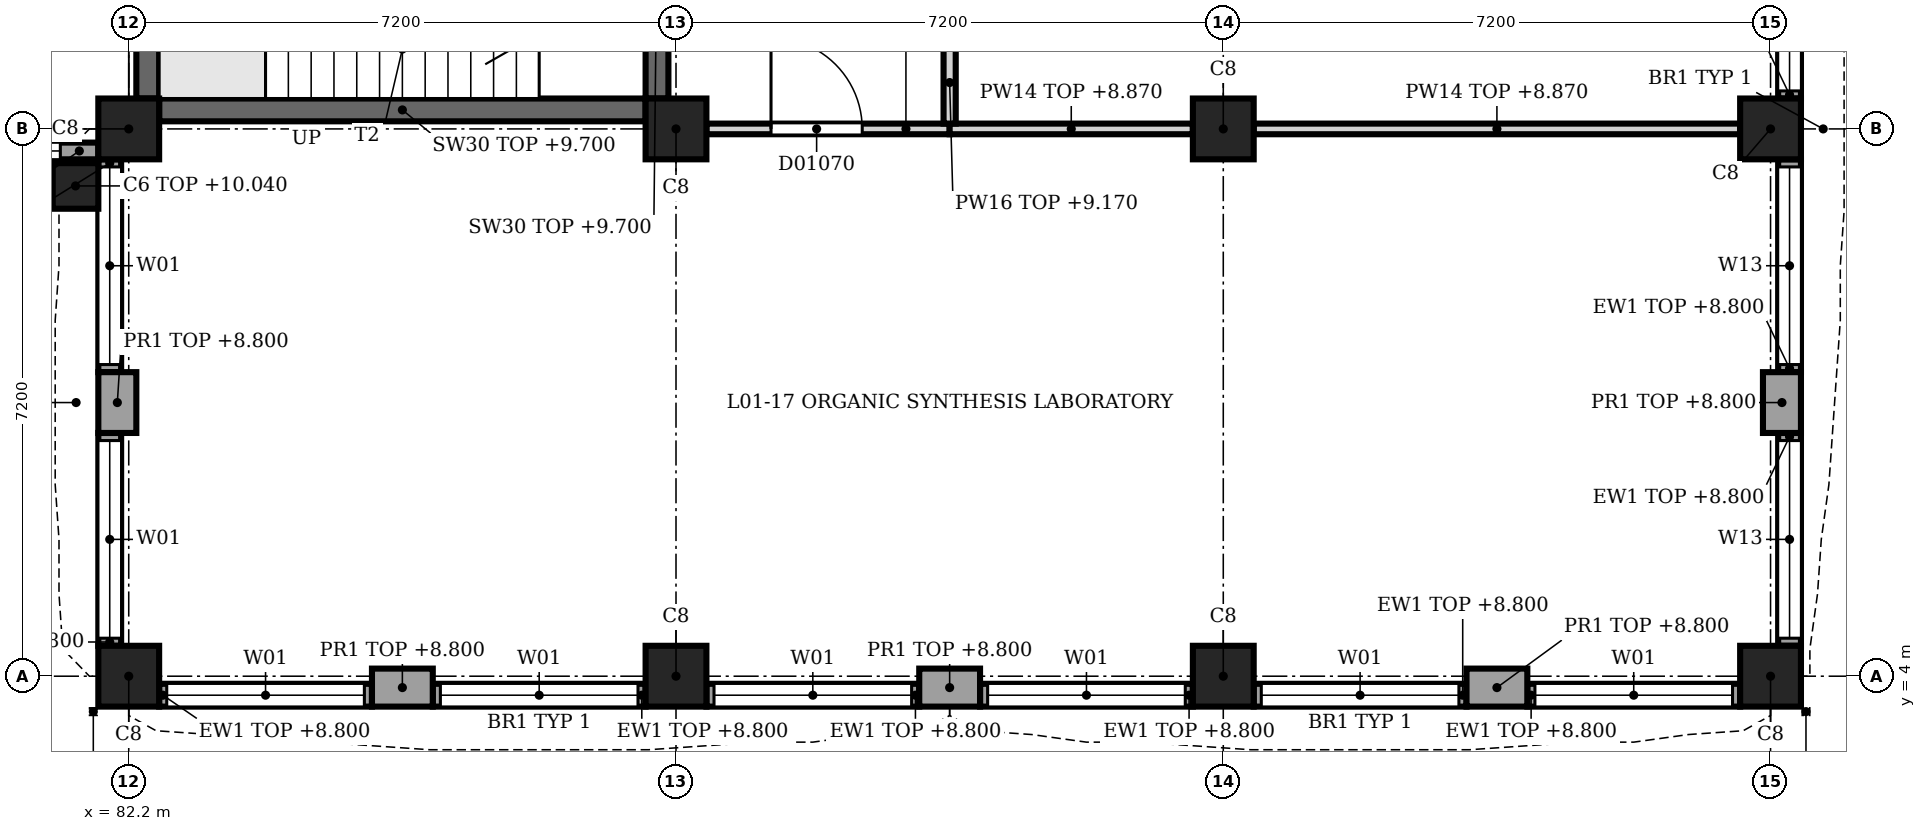
"""IFC4 building model, lengths in metres.
Left out: names, types, materials, properties, quantities, classifications, styles, units other than length and angle.
Written with IfcOpenShell. Run it as: python <this file> out.ifc"""

import sys

from ifc_helpers import new_model, si_unit, direction, frame, frame_2d, origin, origin_2d, place, context, subcontext, project, spatial, rectangle, extrude, element, fill, save


model = new_model("IFC4")
c1 = context("Model", 3, precision=1e-05, world=origin(), true_north=direction((0.0, 1.0)))
c2 = subcontext(c1, "Body", "Model", "MODEL_VIEW")
j1 = project(units=[si_unit("LENGTHUNIT", "METRE"), si_unit("PLANEANGLEUNIT", "RADIAN")], contexts=[c1])
p1 = place(None, origin())
s1 = spatial("IfcSite", under=j1, at=p1, CompositionType="ELEMENT")
p2 = place(p1, origin())
s2 = spatial("IfcBuilding", under=s1, at=p2, CompositionType="ELEMENT")
p3 = place(p2, frame((0.0, 0.0, 5.4)))
s3 = spatial("IfcBuildingStorey", under=s2, at=p3, CompositionType="ELEMENT", Elevation=5.4)
for number, where, z_axis, x_axis in (
    (1, (82.2, 4.0, 0.0), (0.0, 0.0, 1.0), (1.0, 0.0, 0.0)),
    (2, (82.2, 11.2, 0.0), (0.0, 0.0, 1.0), (1.0, 0.0, 0.0)),
    (3, (89.4, 4.0, 0.0), (0.0, 0.0, 1.0), (1.0, 0.0, 0.0)),
    (4, (89.4, 11.2, 0.0), (0.0, 0.0, 1.0), (1.0, 0.0, 0.0)),
    (5, (96.6, 4.0, 0.0), (0.0, 0.0, 1.0), (1.0, 0.0, 0.0)),
    (6, (96.6, 11.2, 0.0), (0.0, 0.0, 1.0), (1.0, 0.0, 0.0)),
    (7, (103.8, 4.0, 0.0), (0.0, 0.0, 1.0), (1.0, 0.0, 0.0)),
    (8, (103.8, 11.2, 0.0), (0.0, 0.0, 1.0), (1.0, 0.0, 0.0)),
):
    element("IfcColumn", number, at=place(p3, frame(where, z_axis=z_axis, x_axis=x_axis)), inside=s3, PredefinedType="COLUMN", context=c2, shape_type="SweptSolid", body=[
        extrude(rectangle(XDim=0.8, YDim=0.8, at=origin_2d()), origin(), (0.0, 0.0, 1.0), 4.5),
    ])
p4 = place(p3, frame((81.5, 10.45, 0.0), z_axis=(0.0, 0.0, 1.0), x_axis=(1.0, 0.0, 0.0)))
e9 = element("IfcColumn", 9, at=p4, inside=s3, PredefinedType="COLUMN", context=c2, shape_type="SweptSolid", body=[
    extrude(rectangle(XDim=0.6, YDim=0.6, at=origin_2d()), origin(), (0.0, 0.0, 1.0), 4.64),
])
p5 = place(p3, frame((103.95, 8.0, 0.0), z_axis=(0.0, 0.0, 1.0), x_axis=(0.0, -1.0, 0.0)))
e10 = element("IfcWall", 10, at=p5, inside=s3, PredefinedType="SOLIDWALL", context=c2, shape_type="SweptSolid", body=[
    extrude(rectangle(XDim=0.8, YDim=0.5, at=frame_2d((0.4, 0.0))), origin(), (0.0, 0.0, 1.0), 3.4),
])
p6 = place(p3, frame((104.05, 14.4, 0.0), z_axis=(0.0, 0.0, 1.0), x_axis=(0.0, -1.0, 0.0)))
e11 = element("IfcWall", 11, at=p6, inside=s3, PredefinedType="SOLIDWALL", context=c2, shape_type="SweptSolid", body=[
    extrude(rectangle(XDim=2.8, YDim=0.3, at=frame_2d((1.4, 0.0))), origin(), (0.0, 0.0, 1.0), 3.4),
])
p7 = place(p6, frame((0.1, 0.0, 0.9)))
e12 = element("IfcOpeningElement", 12, at=p7, cuts=e11, PredefinedType="OPENING", context=c2, shape_type="SweptSolid", body=[
    extrude(rectangle(XDim=2.6, YDim=2.2, at=frame_2d((1.3, 1.1))), frame((0.0, 0.16, 0.0), z_axis=(0.0, -1.0, 0.0), x_axis=(1.0, 0.0, 0.0)), (0.0, 0.0, 1.0), 0.32),
])
p8 = place(p3, frame((104.05, 10.8, 0.0), z_axis=(0.0, 0.0, 1.0), x_axis=(0.0, -1.0, 0.0)))
e13 = element("IfcWall", 13, at=p8, inside=s3, PredefinedType="SOLIDWALL", context=c2, shape_type="SweptSolid", body=[
    extrude(rectangle(XDim=2.8, YDim=0.3, at=frame_2d((1.4, 0.0))), origin(), (0.0, 0.0, 1.0), 3.4),
])
p9 = place(p8, frame((0.1, 0.0, 0.9)))
e14 = element("IfcOpeningElement", 14, at=p9, cuts=e13, PredefinedType="OPENING", context=c2, shape_type="SweptSolid", body=[
    extrude(rectangle(XDim=2.6, YDim=2.2, at=frame_2d((1.3, 1.1))), frame((0.0, 0.16, 0.0), z_axis=(0.0, -1.0, 0.0), x_axis=(1.0, 0.0, 0.0)), (0.0, 0.0, 1.0), 0.32),
])
p10 = place(p3, frame((104.05, 7.2, 0.0), z_axis=(0.0, 0.0, 1.0), x_axis=(0.0, -1.0, 0.0)))
e15 = element("IfcWall", 15, at=p10, inside=s3, PredefinedType="SOLIDWALL", context=c2, shape_type="SweptSolid", body=[
    extrude(rectangle(XDim=2.8, YDim=0.3, at=frame_2d((1.4, 0.0))), origin(), (0.0, 0.0, 1.0), 3.4),
])
p11 = place(p10, frame((0.1, 0.0, 0.9)))
e16 = element("IfcOpeningElement", 16, at=p11, cuts=e15, PredefinedType="OPENING", context=c2, shape_type="SweptSolid", body=[
    extrude(rectangle(XDim=2.6, YDim=2.2, at=frame_2d((1.3, 1.1))), frame((0.0, 0.16, 0.0), z_axis=(0.0, -1.0, 0.0), x_axis=(1.0, 0.0, 0.0)), (0.0, 0.0, 1.0), 0.32),
])
p12 = place(p3, frame((100.6, 3.85, 0.0), z_axis=(0.0, 0.0, 1.0), x_axis=(-1.0, 0.0, 0.0)))
e17 = element("IfcWall", 17, at=p12, inside=s3, PredefinedType="SOLIDWALL", context=c2, shape_type="SweptSolid", body=[
    extrude(rectangle(XDim=0.8, YDim=0.5, at=frame_2d((0.4, 0.0))), origin(), (0.0, 0.0, 1.0), 3.4),
])
p13 = place(p3, frame((93.4, 3.85, 0.0), z_axis=(0.0, 0.0, 1.0), x_axis=(-1.0, 0.0, 0.0)))
e18 = element("IfcWall", 18, at=p13, inside=s3, PredefinedType="SOLIDWALL", context=c2, shape_type="SweptSolid", body=[
    extrude(rectangle(XDim=0.8, YDim=0.5, at=frame_2d((0.4, 0.0))), origin(), (0.0, 0.0, 1.0), 3.4),
])
p14 = place(p3, frame((86.2, 3.85, 0.0), z_axis=(0.0, 0.0, 1.0), x_axis=(-1.0, 0.0, 0.0)))
e19 = element("IfcWall", 19, at=p14, inside=s3, PredefinedType="SOLIDWALL", context=c2, shape_type="SweptSolid", body=[
    extrude(rectangle(XDim=0.8, YDim=0.5, at=frame_2d((0.4, 0.0))), origin(), (0.0, 0.0, 1.0), 3.4),
])
p15 = place(p3, frame((103.4, 3.75, 0.0), z_axis=(0.0, 0.0, 1.0), x_axis=(-1.0, 0.0, 0.0)))
e20 = element("IfcWall", 20, at=p15, inside=s3, PredefinedType="SOLIDWALL", context=c2, shape_type="SweptSolid", body=[
    extrude(rectangle(XDim=2.8, YDim=0.3, at=frame_2d((1.4, 0.0))), origin(), (0.0, 0.0, 1.0), 3.4),
])
p16 = place(p15, frame((0.1, 0.0, 0.9)))
e21 = element("IfcOpeningElement", 21, at=p16, cuts=e20, PredefinedType="OPENING", context=c2, shape_type="SweptSolid", body=[
    extrude(rectangle(XDim=2.6, YDim=2.4, at=frame_2d((1.3, 1.2))), frame((0.0, 0.16, 0.0), z_axis=(0.0, -1.0, 0.0), x_axis=(1.0, 0.0, 0.0)), (0.0, 0.0, 1.0), 0.32),
])
p17 = place(p3, frame((99.8, 3.75, 0.0), z_axis=(0.0, 0.0, 1.0), x_axis=(-1.0, 0.0, 0.0)))
e22 = element("IfcWall", 22, at=p17, inside=s3, PredefinedType="SOLIDWALL", context=c2, shape_type="SweptSolid", body=[
    extrude(rectangle(XDim=2.8, YDim=0.3, at=frame_2d((1.4, 0.0))), origin(), (0.0, 0.0, 1.0), 3.4),
])
p18 = place(p17, frame((0.1, 0.0, 0.9)))
e23 = element("IfcOpeningElement", 23, at=p18, cuts=e22, PredefinedType="OPENING", context=c2, shape_type="SweptSolid", body=[
    extrude(rectangle(XDim=2.6, YDim=2.4, at=frame_2d((1.3, 1.2))), frame((0.0, 0.16, 0.0), z_axis=(0.0, -1.0, 0.0), x_axis=(1.0, 0.0, 0.0)), (0.0, 0.0, 1.0), 0.32),
])
p19 = place(p3, frame((96.2, 3.75, 0.0), z_axis=(0.0, 0.0, 1.0), x_axis=(-1.0, 0.0, 0.0)))
e24 = element("IfcWall", 24, at=p19, inside=s3, PredefinedType="SOLIDWALL", context=c2, shape_type="SweptSolid", body=[
    extrude(rectangle(XDim=2.8, YDim=0.3, at=frame_2d((1.4, 0.0))), origin(), (0.0, 0.0, 1.0), 3.4),
])
p20 = place(p19, frame((0.1, 0.0, 0.9)))
e25 = element("IfcOpeningElement", 25, at=p20, cuts=e24, PredefinedType="OPENING", context=c2, shape_type="SweptSolid", body=[
    extrude(rectangle(XDim=2.6, YDim=2.4, at=frame_2d((1.3, 1.2))), frame((0.0, 0.16, 0.0), z_axis=(0.0, -1.0, 0.0), x_axis=(1.0, 0.0, 0.0)), (0.0, 0.0, 1.0), 0.32),
])
p21 = place(p3, frame((92.6, 3.75, 0.0), z_axis=(0.0, 0.0, 1.0), x_axis=(-1.0, 0.0, 0.0)))
e26 = element("IfcWall", 26, at=p21, inside=s3, PredefinedType="SOLIDWALL", context=c2, shape_type="SweptSolid", body=[
    extrude(rectangle(XDim=2.8, YDim=0.3, at=frame_2d((1.4, 0.0))), origin(), (0.0, 0.0, 1.0), 3.4),
])
p22 = place(p21, frame((0.1, 0.0, 0.9)))
e27 = element("IfcOpeningElement", 27, at=p22, cuts=e26, PredefinedType="OPENING", context=c2, shape_type="SweptSolid", body=[
    extrude(rectangle(XDim=2.6, YDim=2.4, at=frame_2d((1.3, 1.2))), frame((0.0, 0.16, 0.0), z_axis=(0.0, -1.0, 0.0), x_axis=(1.0, 0.0, 0.0)), (0.0, 0.0, 1.0), 0.32),
])
p23 = place(p3, frame((89.0, 3.75, 0.0), z_axis=(0.0, 0.0, 1.0), x_axis=(-1.0, 0.0, 0.0)))
e28 = element("IfcWall", 28, at=p23, inside=s3, PredefinedType="SOLIDWALL", context=c2, shape_type="SweptSolid", body=[
    extrude(rectangle(XDim=2.8, YDim=0.3, at=frame_2d((1.4, 0.0))), origin(), (0.0, 0.0, 1.0), 3.4),
])
p24 = place(p23, frame((0.1, 0.0, 0.9)))
e29 = element("IfcOpeningElement", 29, at=p24, cuts=e28, PredefinedType="OPENING", context=c2, shape_type="SweptSolid", body=[
    extrude(rectangle(XDim=2.6, YDim=2.4, at=frame_2d((1.3, 1.2))), frame((0.0, 0.16, 0.0), z_axis=(0.0, -1.0, 0.0), x_axis=(1.0, 0.0, 0.0)), (0.0, 0.0, 1.0), 0.32),
])
p25 = place(p3, frame((85.4, 3.75, 0.0), z_axis=(0.0, 0.0, 1.0), x_axis=(-1.0, 0.0, 0.0)))
e30 = element("IfcWall", 30, at=p25, inside=s3, PredefinedType="SOLIDWALL", context=c2, shape_type="SweptSolid", body=[
    extrude(rectangle(XDim=2.8, YDim=0.3, at=frame_2d((1.4, 0.0))), origin(), (0.0, 0.0, 1.0), 3.4),
])
p26 = place(p25, frame((0.1, 0.0, 0.9)))
e31 = element("IfcOpeningElement", 31, at=p26, cuts=e30, PredefinedType="OPENING", context=c2, shape_type="SweptSolid", body=[
    extrude(rectangle(XDim=2.6, YDim=2.4, at=frame_2d((1.3, 1.2))), frame((0.0, 0.16, 0.0), z_axis=(0.0, -1.0, 0.0), x_axis=(1.0, 0.0, 0.0)), (0.0, 0.0, 1.0), 0.32),
])
p27 = place(p3, frame((82.05, 7.2, 0.0), z_axis=(0.0, 0.0, 1.0), x_axis=(0.0, 1.0, 0.0)))
e32 = element("IfcWall", 32, at=p27, inside=s3, PredefinedType="SOLIDWALL", context=c2, shape_type="SweptSolid", body=[
    extrude(rectangle(XDim=0.8, YDim=0.5, at=frame_2d((0.4, 0.0))), origin(), (0.0, 0.0, 1.0), 3.4),
])
p28 = place(p3, frame((81.95, 4.4, 0.0), z_axis=(0.0, 0.0, 1.0), x_axis=(0.0, 1.0, 0.0)))
e33 = element("IfcWall", 33, at=p28, inside=s3, PredefinedType="SOLIDWALL", context=c2, shape_type="SweptSolid", body=[
    extrude(rectangle(XDim=2.8, YDim=0.3, at=frame_2d((1.4, 0.0))), origin(), (0.0, 0.0, 1.0), 3.4),
])
p29 = place(p28, frame((0.1, 0.0, 0.9)))
e34 = element("IfcOpeningElement", 34, at=p29, cuts=e33, PredefinedType="OPENING", context=c2, shape_type="SweptSolid", body=[
    extrude(rectangle(XDim=2.6, YDim=2.4, at=frame_2d((1.3, 1.2))), frame((0.0, 0.16, 0.0), z_axis=(0.0, -1.0, 0.0), x_axis=(1.0, 0.0, 0.0)), (0.0, 0.0, 1.0), 0.32),
])
p30 = place(p3, frame((81.95, 8.0, 0.0), z_axis=(0.0, 0.0, 1.0), x_axis=(0.0, 1.0, 0.0)))
e35 = element("IfcWall", 35, at=p30, inside=s3, PredefinedType="SOLIDWALL", context=c2, shape_type="SweptSolid", body=[
    extrude(rectangle(XDim=2.8, YDim=0.3, at=frame_2d((1.4, 0.0))), origin(), (0.0, 0.0, 1.0), 3.4),
])
p31 = place(p30, frame((0.1, 0.0, 0.9)))
e36 = element("IfcOpeningElement", 36, at=p31, cuts=e35, PredefinedType="OPENING", context=c2, shape_type="SweptSolid", body=[
    extrude(rectangle(XDim=2.6, YDim=2.4, at=frame_2d((1.3, 1.2))), frame((0.0, 0.16, 0.0), z_axis=(0.0, -1.0, 0.0), x_axis=(1.0, 0.0, 0.0)), (0.0, 0.0, 1.0), 0.32),
])
p32 = place(p3, frame((81.8, 10.91, 0.0), z_axis=(0.0, 0.0, 1.0), x_axis=(-1.0, 0.0, 0.0)))
e37 = element("IfcWall", 37, at=p32, inside=s3, PredefinedType="SOLIDWALL", context=c2, shape_type="SweptSolid", body=[
    extrude(rectangle(XDim=2.8, YDim=0.22, at=frame_2d((1.4, 0.0))), origin(), (0.0, 0.0, 1.0), 3.4),
])
p33 = place(p32, frame((0.5, 0.0, 0.9)))
e38 = element("IfcOpeningElement", 38, at=p33, cuts=e37, PredefinedType="OPENING", context=c2, shape_type="SweptSolid", body=[
    extrude(rectangle(XDim=1.8, YDim=2.4, at=frame_2d((0.9, 1.2))), frame((0.0, 0.12, 0.0), z_axis=(0.0, -1.0, 0.0), x_axis=(1.0, 0.0, 0.0)), (0.0, 0.0, 1.0), 0.24),
])
p34 = place(p3, frame((89.15, 11.6, 0.0), z_axis=(0.0, 0.0, 1.0), x_axis=(0.0, 1.0, 0.0)))
e39 = element("IfcWall", 39, at=p34, inside=s3, PredefinedType="SHEAR", context=c2, shape_type="SweptSolid", body=[
    extrude(rectangle(XDim=6.4, YDim=0.3, at=frame_2d((3.2, 0.0))), origin(), (0.0, 0.0, 1.0), 4.3),
])
p35 = place(p34, frame((4.2, 0.0, 0.0)))
e40 = element("IfcOpeningElement", 40, at=p35, cuts=e39, PredefinedType="OPENING", context=c2, shape_type="SweptSolid", body=[
    extrude(rectangle(XDim=1.2, YDim=2.1, at=frame_2d((0.6, 1.05))), frame((0.0, 0.16, 0.0), z_axis=(0.0, -1.0, 0.0), x_axis=(1.0, 0.0, 0.0)), (0.0, 0.0, 1.0), 0.32),
])
for number, where, z_axis, x_axis in (
    (41, (82.45, 11.6, 0.0), (0.0, 0.0, 1.0), (0.0, 1.0, 0.0)),
    (42, (82.6, 11.45, 0.0), (0.0, 0.0, 1.0), (1.0, 0.0, 0.0)),
):
    element("IfcWall", number, at=place(p3, frame(where, z_axis=z_axis, x_axis=x_axis)), inside=s3, PredefinedType="SHEAR", context=c2, shape_type="SweptSolid", body=[
        extrude(rectangle(XDim=6.4, YDim=0.3, at=frame_2d((3.2, 0.0))), origin(), (0.0, 0.0, 1.0), 4.3),
    ])
p36 = place(p3, frame((93.0, 11.2, 0.0), z_axis=(0.0, 0.0, 1.0), x_axis=(-1.0, 0.0, 0.0)))
e43 = element("IfcWall", 43, at=p36, inside=s3, PredefinedType="PARTITIONING", context=c2, shape_type="SweptSolid", body=[
    extrude(rectangle(XDim=3.2, YDim=0.14, at=frame_2d((1.6, 0.0))), origin(), (0.0, 0.0, 1.0), 3.47),
])
p37 = place(p36, frame((1.15, 0.0, 0.0)))
e44 = element("IfcOpeningElement", 44, at=p37, cuts=e43, PredefinedType="OPENING", context=c2, shape_type="SweptSolid", body=[
    extrude(rectangle(XDim=1.2, YDim=2.1, at=frame_2d((0.6, 1.05))), frame((0.0, 0.08, 0.0), z_axis=(0.0, -1.0, 0.0), x_axis=(1.0, 0.0, 0.0)), (0.0, 0.0, 1.0), 0.16),
])
p38 = place(p3, frame((93.0, 11.2, 0.0), z_axis=(0.0, 0.0, 1.0), x_axis=(1.0, 0.0, 0.0)))
e45 = element("IfcWall", 45, at=p38, inside=s3, PredefinedType="PARTITIONING", context=c2, shape_type="SweptSolid", body=[
    extrude(rectangle(XDim=3.2, YDim=0.14, at=frame_2d((1.6, 0.0))), origin(), (0.0, 0.0, 1.0), 3.47),
])
p39 = place(p3, frame((97.0, 11.2, 0.0), z_axis=(0.0, 0.0, 1.0), x_axis=(1.0, 0.0, 0.0)))
e46 = element("IfcWall", 46, at=p39, inside=s3, PredefinedType="PARTITIONING", context=c2, shape_type="SweptSolid", body=[
    extrude(rectangle(XDim=6.4, YDim=0.14, at=frame_2d((3.2, 0.0))), origin(), (0.0, 0.0, 1.0), 3.47),
])
p40 = place(p3, frame((93.0, 14.69, 0.0), z_axis=(0.0, 0.0, 1.0), x_axis=(0.0, -1.0, 0.0)))
e47 = element("IfcWall", 47, at=p40, inside=s3, PredefinedType="PARTITIONING", context=c2, shape_type="SweptSolid", body=[
    extrude(rectangle(XDim=3.42, YDim=0.16, at=frame_2d((1.71, 0.0))), origin(), (0.0, 0.0, 1.0), 3.77),
])
p41 = place(p40, frame((1.04, 0.0, 0.0)))
e48 = element("IfcOpeningElement", 48, at=p41, cuts=e47, PredefinedType="OPENING", context=c2, shape_type="SweptSolid", body=[
    extrude(rectangle(XDim=1.3, YDim=2.2, at=frame_2d((0.65, 1.1))), frame((0.0, 0.09, 0.0), z_axis=(0.0, -1.0, 0.0), x_axis=(1.0, 0.0, 0.0)), (0.0, 0.0, 1.0), 0.18),
])
p42 = place(p7, origin())
e49 = element("IfcWindow", 49, at=p42, inside=s3, PartitioningType="SINGLE_PANEL", PredefinedType="WINDOW", context=c2, shape_type="SweptSolid", body=[
    extrude(rectangle(XDim=2.6, YDim=2.2, at=frame_2d((1.3, 1.1))), frame((0.0, 0.03, 0.0), z_axis=(0.0, -1.0, 0.0), x_axis=(1.0, 0.0, 0.0)), (0.0, 0.0, 1.0), 0.06),
])
fill(e12, e49)
p43 = place(p9, origin())
e50 = element("IfcWindow", 50, at=p43, inside=s3, PartitioningType="SINGLE_PANEL", PredefinedType="WINDOW", context=c2, shape_type="SweptSolid", body=[
    extrude(rectangle(XDim=2.6, YDim=2.2, at=frame_2d((1.3, 1.1))), frame((0.0, 0.03, 0.0), z_axis=(0.0, -1.0, 0.0), x_axis=(1.0, 0.0, 0.0)), (0.0, 0.0, 1.0), 0.06),
])
fill(e14, e50)
p44 = place(p11, origin())
e51 = element("IfcWindow", 51, at=p44, inside=s3, PartitioningType="SINGLE_PANEL", PredefinedType="WINDOW", context=c2, shape_type="SweptSolid", body=[
    extrude(rectangle(XDim=2.6, YDim=2.2, at=frame_2d((1.3, 1.1))), frame((0.0, 0.03, 0.0), z_axis=(0.0, -1.0, 0.0), x_axis=(1.0, 0.0, 0.0)), (0.0, 0.0, 1.0), 0.06),
])
fill(e16, e51)
p45 = place(p16, origin())
e52 = element("IfcWindow", 52, at=p45, inside=s3, PartitioningType="SINGLE_PANEL", PredefinedType="WINDOW", context=c2, shape_type="SweptSolid", body=[
    extrude(rectangle(XDim=2.6, YDim=2.4, at=frame_2d((1.3, 1.2))), frame((0.0, 0.03, 0.0), z_axis=(0.0, -1.0, 0.0), x_axis=(1.0, 0.0, 0.0)), (0.0, 0.0, 1.0), 0.06),
])
fill(e21, e52)
p46 = place(p18, origin())
e53 = element("IfcWindow", 53, at=p46, inside=s3, PartitioningType="SINGLE_PANEL", PredefinedType="WINDOW", context=c2, shape_type="SweptSolid", body=[
    extrude(rectangle(XDim=2.6, YDim=2.4, at=frame_2d((1.3, 1.2))), frame((0.0, 0.03, 0.0), z_axis=(0.0, -1.0, 0.0), x_axis=(1.0, 0.0, 0.0)), (0.0, 0.0, 1.0), 0.06),
])
fill(e23, e53)
p47 = place(p20, origin())
e54 = element("IfcWindow", 54, at=p47, inside=s3, PartitioningType="SINGLE_PANEL", PredefinedType="WINDOW", context=c2, shape_type="SweptSolid", body=[
    extrude(rectangle(XDim=2.6, YDim=2.4, at=frame_2d((1.3, 1.2))), frame((0.0, 0.03, 0.0), z_axis=(0.0, -1.0, 0.0), x_axis=(1.0, 0.0, 0.0)), (0.0, 0.0, 1.0), 0.06),
])
fill(e25, e54)
p48 = place(p22, origin())
e55 = element("IfcWindow", 55, at=p48, inside=s3, PartitioningType="SINGLE_PANEL", PredefinedType="WINDOW", context=c2, shape_type="SweptSolid", body=[
    extrude(rectangle(XDim=2.6, YDim=2.4, at=frame_2d((1.3, 1.2))), frame((0.0, 0.03, 0.0), z_axis=(0.0, -1.0, 0.0), x_axis=(1.0, 0.0, 0.0)), (0.0, 0.0, 1.0), 0.06),
])
fill(e27, e55)
p49 = place(p24, origin())
e56 = element("IfcWindow", 56, at=p49, inside=s3, PartitioningType="SINGLE_PANEL", PredefinedType="WINDOW", context=c2, shape_type="SweptSolid", body=[
    extrude(rectangle(XDim=2.6, YDim=2.4, at=frame_2d((1.3, 1.2))), frame((0.0, 0.03, 0.0), z_axis=(0.0, -1.0, 0.0), x_axis=(1.0, 0.0, 0.0)), (0.0, 0.0, 1.0), 0.06),
])
fill(e29, e56)
p50 = place(p26, origin())
e57 = element("IfcWindow", 57, at=p50, inside=s3, PartitioningType="SINGLE_PANEL", PredefinedType="WINDOW", context=c2, shape_type="SweptSolid", body=[
    extrude(rectangle(XDim=2.6, YDim=2.4, at=frame_2d((1.3, 1.2))), frame((0.0, 0.03, 0.0), z_axis=(0.0, -1.0, 0.0), x_axis=(1.0, 0.0, 0.0)), (0.0, 0.0, 1.0), 0.06),
])
fill(e31, e57)
p51 = place(p29, origin())
e58 = element("IfcWindow", 58, at=p51, inside=s3, PartitioningType="SINGLE_PANEL", PredefinedType="WINDOW", context=c2, shape_type="SweptSolid", body=[
    extrude(rectangle(XDim=2.6, YDim=2.4, at=frame_2d((1.3, 1.2))), frame((0.0, 0.03, 0.0), z_axis=(0.0, -1.0, 0.0), x_axis=(1.0, 0.0, 0.0)), (0.0, 0.0, 1.0), 0.06),
])
fill(e34, e58)
p52 = place(p31, origin())
e59 = element("IfcWindow", 59, at=p52, inside=s3, PartitioningType="SINGLE_PANEL", PredefinedType="WINDOW", context=c2, shape_type="SweptSolid", body=[
    extrude(rectangle(XDim=2.6, YDim=2.4, at=frame_2d((1.3, 1.2))), frame((0.0, 0.03, 0.0), z_axis=(0.0, -1.0, 0.0), x_axis=(1.0, 0.0, 0.0)), (0.0, 0.0, 1.0), 0.06),
])
fill(e36, e59)
p53 = place(p33, origin())
e60 = element("IfcWindow", 60, at=p53, inside=s3, PartitioningType="SINGLE_PANEL", PredefinedType="WINDOW", context=c2, shape_type="SweptSolid", body=[
    extrude(rectangle(XDim=1.8, YDim=2.4, at=frame_2d((0.9, 1.2))), frame((0.0, 0.03, 0.0), z_axis=(0.0, -1.0, 0.0), x_axis=(1.0, 0.0, 0.0)), (0.0, 0.0, 1.0), 0.06),
])
fill(e38, e60)
p54 = place(p37, origin())
e61 = element("IfcDoor", 61, at=p54, inside=s3, OperationType="SINGLE_SWING_RIGHT", PredefinedType="DOOR", context=c2, shape_type="SweptSolid", body=[
    extrude(rectangle(XDim=1.2, YDim=2.1, at=frame_2d((0.6, 1.05))), frame((0.0, 0.025, 0.0), z_axis=(0.0, -1.0, 0.0), x_axis=(1.0, 0.0, 0.0)), (0.0, 0.0, 1.0), 0.05),
])
fill(e44, e61)
save(model, sys.argv[1])
